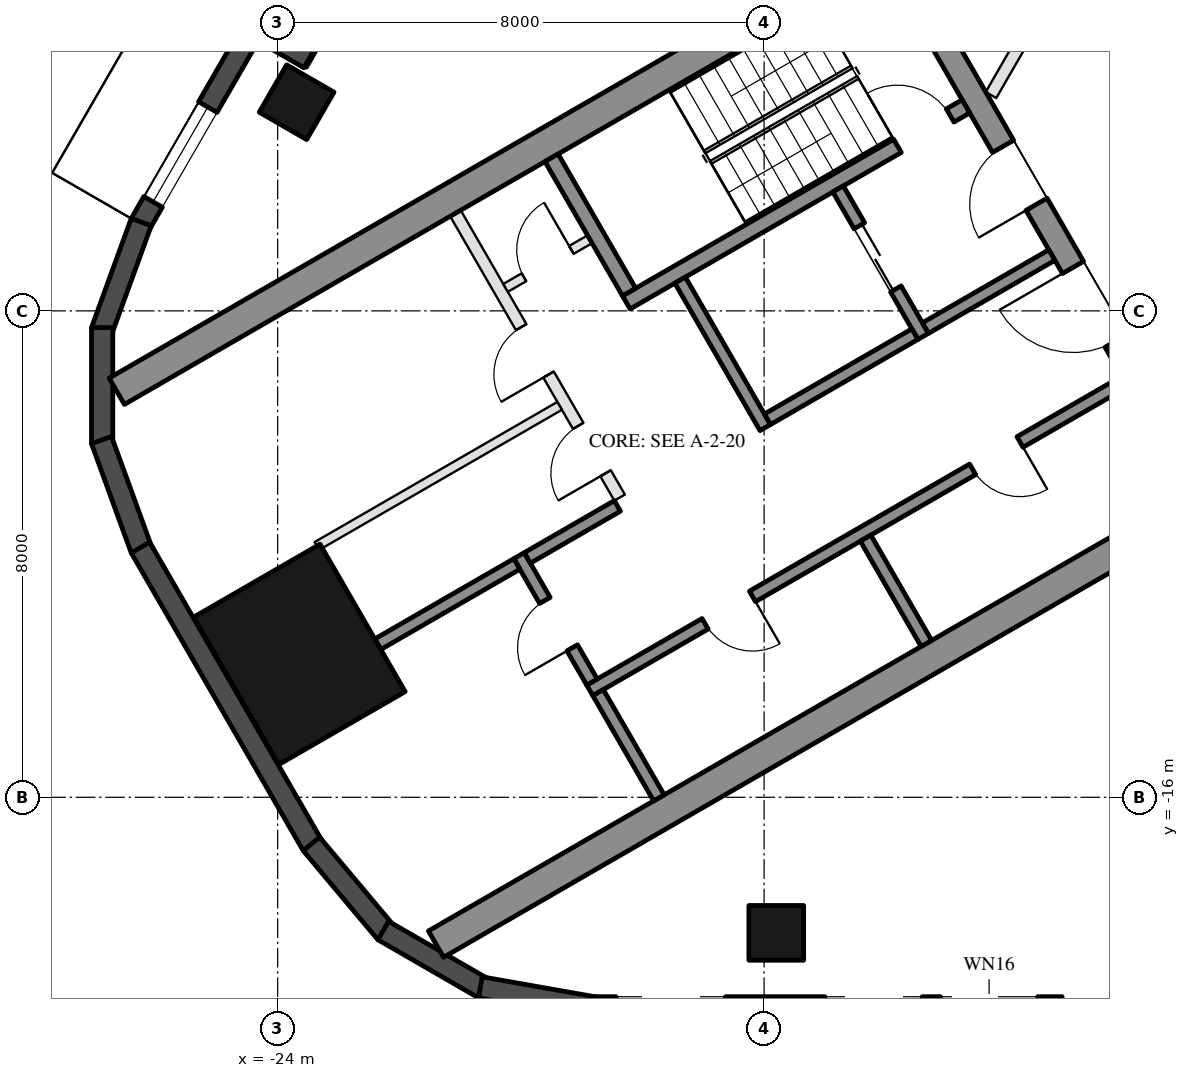
"""IFC4 building model, lengths in metres.
Left out: names, types, materials, properties, quantities, classifications, styles, units other than length and angle.
Written with IfcOpenShell. Run it as: python <this file> out.ifc"""

import sys

from ifc_helpers import new_model, si_unit, direction, frame, frame_2d, origin, origin_2d, place, context, subcontext, project, spatial, rectangle, hollow_rectangle, extrude, element, fill, save


model = new_model("IFC4")
c1 = context("Model", 3, precision=1e-05, world=origin(), true_north=direction((0.0, 1.0)))
c2 = subcontext(c1, "Body", "Model", "MODEL_VIEW")
j1 = project(units=[si_unit("LENGTHUNIT", "METRE"), si_unit("PLANEANGLEUNIT", "RADIAN")], contexts=[c1])
p1 = place(None, origin())
s1 = spatial("IfcSite", under=j1, at=p1, CompositionType="ELEMENT")
p2 = place(p1, origin())
s2 = spatial("IfcBuilding", under=s1, at=p2, CompositionType="ELEMENT")
p3 = place(p2, frame((0.0, 0.0, 94.6)))
s3 = spatial("IfcBuildingStorey", under=s2, at=p3, CompositionType="ELEMENT", Elevation=94.6)
for number, where, z_axis, x_axis in (
    (1, (-15.8, -18.23, 0.0), (0.0, 0.0, 1.0), (-1.0, 0.0, 0.0)),
    (2, (-23.688, -4.568, 0.0), (0.0, 0.0, 1.0), (0.5, 0.866, 0.0)),
):
    element("IfcColumn", number, at=place(p3, frame(where, z_axis=z_axis, x_axis=x_axis)), inside=s3, PredefinedType="COLUMN", context=c2, shape_type="SweptSolid", body=[
        extrude(hollow_rectangle(XDim=0.9, YDim=0.9, WallThickness=0.04, at=origin_2d()), origin(), (0.0, 0.0, 1.0), 3.7),
    ])
p4 = place(p3, frame((-23.643, -13.65, 0.0), z_axis=(0.0, 0.0, 1.0), x_axis=(-0.5, 0.866025403784, 0.0)))
e3 = element("IfcColumn", 3, at=p4, inside=s3, PredefinedType="COLUMN", context=c2, shape_type="SweptSolid", body=[
    extrude(hollow_rectangle(XDim=2.8, YDim=2.4, WallThickness=0.07, at=origin_2d()), origin(), (0.0, 0.0, 1.0), 3.7),
])
p5 = place(p3, frame((-20.309, 1.934, 0.0), z_axis=(0.0, 0.0, 1.0), x_axis=(-0.499992114976, -0.866029956157, 0.0)))
e4 = element("IfcWall", 4, at=p5, inside=s3, PredefinedType="SOLIDWALL", context=c2, shape_type="SweptSolid", body=[
    extrude(rectangle(XDim=6.74, YDim=0.35, at=frame_2d((3.37, 0.0))), origin(), (0.0, 0.0, 1.0), 3.55),
])
p6 = place(p5, frame((4.02, 0.0, 0.0)))
e5 = element("IfcOpeningElement", 5, at=p6, cuts=e4, PredefinedType="OPENING", context=c2, shape_type="SweptSolid", body=[
    extrude(rectangle(XDim=2.4, YDim=2.4, at=frame_2d((1.2, 1.2))), frame((0.0, 0.185, 0.0), z_axis=(0.0, -1.0, 0.0), x_axis=(1.0, 0.0, 0.0)), (0.0, 0.0, 1.0), 0.37),
])
p7 = place(p5, frame((0.77, 0.0, 0.3)))
e6 = element("IfcOpeningElement", 6, at=p7, cuts=e4, PredefinedType="OPENING", context=c2, shape_type="SweptSolid", body=[
    extrude(rectangle(XDim=2.9, YDim=2.65, at=frame_2d((1.45, 1.325))), frame((0.0, 0.185, 0.0), z_axis=(0.0, -1.0, 0.0), x_axis=(1.0, 0.0, 0.0)), (0.0, 0.0, 1.0), 0.37),
])
p8 = place(p3, frame((-23.481, -3.85, 0.0), z_axis=(0.0, 0.0, 1.0), x_axis=(-0.866092288191, 0.499884134912, 0.0)))
e7 = element("IfcWall", 7, at=p8, inside=s3, PredefinedType="SOLIDWALL", context=c2, shape_type="SweptSolid", body=[
    extrude(rectangle(XDim=1.22, YDim=0.35, at=frame_2d((0.61, 0.0))), origin(), (0.0, 0.0, 1.0), 3.55),
])
p9 = place(p3, frame((-24.299, -3.176, 0.0), z_axis=(0.0, 0.0, 1.0), x_axis=(-0.500028278809, -0.866009076391, 0.0)))
e8 = element("IfcWall", 8, at=p9, inside=s3, PredefinedType="SOLIDWALL", context=c2, shape_type="SweptSolid", body=[
    extrude(rectangle(XDim=3.916, YDim=0.35, at=frame_2d((1.958, 0.0))), origin(), (0.0, 0.0, 1.0), 3.55),
])
p10 = place(p9, frame((1.7, 0.0, 0.3)))
e9 = element("IfcOpeningElement", 9, at=p10, cuts=e8, PredefinedType="OPENING", context=c2, shape_type="SweptSolid", body=[
    extrude(rectangle(XDim=1.8, YDim=2.65, at=frame_2d((0.9, 1.325))), frame((0.0, 0.185, 0.0), z_axis=(0.0, -1.0, 0.0), x_axis=(1.0, 0.0, 0.0)), (0.0, 0.0, 1.0), 0.37),
])
for number, where, z_axis, x_axis in (
    (10, (-26.244, -6.54, 0.0), (0.0, 0.0, 1.0), (-0.342, -0.94, 0.0)),
    (11, (-26.886, -8.275, 0.0), (0.0, 0.0, 1.0), (0.0, -1.0, 0.0)),
    (12, (-26.897, -10.125, 0.0), (0.0, 0.0, 1.0), (0.342, -0.94, 0.0)),
):
    element("IfcWall", number, at=place(p3, frame(where, z_axis=z_axis, x_axis=x_axis)), inside=s3, PredefinedType="SOLIDWALL", context=c2, shape_type="SweptSolid", body=[
        extrude(rectangle(XDim=1.91, YDim=0.35, at=frame_2d((0.955, 0.0))), origin(), (0.0, 0.0, 1.0), 3.55),
    ])
p11 = place(p3, frame((-26.257, -11.893, 0.0), z_axis=(0.0, 0.0, 1.0), x_axis=(0.500018773155, -0.866014564827, 0.0)))
e13 = element("IfcWall", 13, at=p11, inside=s3, PredefinedType="SOLIDWALL", context=c2, shape_type="SweptSolid", body=[
    extrude(rectangle(XDim=5.658, YDim=0.35, at=frame_2d((2.829, 0.0))), origin(), (0.0, 0.0, 1.0), 3.55),
])
for number, where, z_axis, x_axis in (
    (14, (-23.445, -16.768, 0.0), (0.0, 0.0, 1.0), (0.643, -0.766, 0.0)),
    (15, (-22.264, -18.192, 0.0), (0.0, 0.0, 1.0), (0.866, -0.5, 0.0)),
):
    element("IfcWall", number, at=place(p3, frame(where, z_axis=z_axis, x_axis=x_axis)), inside=s3, PredefinedType="SOLIDWALL", context=c2, shape_type="SweptSolid", body=[
        extrude(rectangle(XDim=1.91, YDim=0.35, at=frame_2d((0.955, 0.0))), origin(), (0.0, 0.0, 1.0), 3.55),
    ])
p12 = place(p3, frame((-20.667, -19.126, 0.0), z_axis=(0.0, 0.0, 1.0), x_axis=(0.984798995425, -0.173697837091, 0.0)))
e16 = element("IfcWall", 16, at=p12, inside=s3, PredefinedType="SOLIDWALL", context=c2, shape_type="SweptSolid", body=[
    extrude(rectangle(XDim=1.91, YDim=0.35, at=frame_2d((0.955, 0.0))), origin(), (0.0, 0.0, 1.0), 3.55),
])
p13 = place(p3, frame((-18.816, -19.455, 0.0), z_axis=(0.0, 0.0, 1.0), x_axis=(1.0, 0.0, 0.0)))
e17 = element("IfcWall", 17, at=p13, inside=s3, PredefinedType="SOLIDWALL", context=c2, shape_type="SweptSolid", body=[
    extrude(rectangle(XDim=11.816, YDim=0.35, at=frame_2d((5.908, 0.0))), origin(), (0.0, 0.0, 1.0), 3.55),
])
p14 = place(p13, frame((0.381, 0.0, 0.3)))
e18 = element("IfcOpeningElement", 18, at=p14, cuts=e17, PredefinedType="OPENING", context=c2, shape_type="SweptSolid", body=[
    extrude(rectangle(XDim=1.8, YDim=2.65, at=frame_2d((0.9, 1.325))), frame((0.0, 0.185, 0.0), z_axis=(0.0, -1.0, 0.0), x_axis=(1.0, 0.0, 0.0)), (0.0, 0.0, 1.0), 0.37),
])
p15 = place(p13, frame((7.716, 0.0, 0.0)))
e19 = element("IfcOpeningElement", 19, at=p15, cuts=e17, PredefinedType="OPENING", context=c2, shape_type="SweptSolid", body=[
    extrude(rectangle(XDim=2.4, YDim=2.4, at=frame_2d((1.2, 1.2))), frame((0.0, 0.185, 0.0), z_axis=(0.0, -1.0, 0.0), x_axis=(1.0, 0.0, 0.0)), (0.0, 0.0, 1.0), 0.37),
])
p16 = place(p13, frame((3.816, 0.0, 0.3)))
e20 = element("IfcOpeningElement", 20, at=p16, cuts=e17, PredefinedType="OPENING", context=c2, shape_type="SweptSolid", body=[
    extrude(rectangle(XDim=1.6, YDim=2.65, at=frame_2d((0.8, 1.325))), frame((0.0, 0.185, 0.0), z_axis=(0.0, -1.0, 0.0), x_axis=(1.0, 0.0, 0.0)), (0.0, 0.0, 1.0), 0.37),
])
p17 = place(p13, frame((5.716, 0.0, 0.3)))
e21 = element("IfcOpeningElement", 21, at=p17, cuts=e17, PredefinedType="OPENING", context=c2, shape_type="SweptSolid", body=[
    extrude(rectangle(XDim=1.6, YDim=2.65, at=frame_2d((0.8, 1.325))), frame((0.0, 0.185, 0.0), z_axis=(0.0, -1.0, 0.0), x_axis=(1.0, 0.0, 0.0)), (0.0, 0.0, 1.0), 0.37),
])
for number, where, z_axis, x_axis in (
    (22, (-13.797, -1.903, 0.0), (0.0, 0.0, 1.0), (-0.866, -0.5, 0.0)),
    (23, (-8.547, -10.997, 0.0), (0.0, 0.0, 1.0), (-0.866, -0.5, 0.0)),
):
    element("IfcWall", number, at=place(p3, frame(where, z_axis=z_axis, x_axis=x_axis)), inside=s3, PredefinedType="SHEAR", context=c2, shape_type="SweptSolid", body=[
        extrude(rectangle(XDim=14.837, YDim=0.5, at=frame_2d((7.418, 0.0))), origin(), (0.0, 0.0, 1.0), 3.5),
    ])
p18 = place(p3, frame((-13.845, -2.22, 0.0), z_axis=(0.0, 0.0, 1.0), x_axis=(0.500004234368, -0.866022959057, 0.0)))
e24 = element("IfcWall", 24, at=p18, inside=s3, PredefinedType="SHEAR", context=c2, shape_type="SweptSolid", body=[
    extrude(rectangle(XDim=10.0, YDim=0.4, at=frame_2d((5.0, 0.0))), origin(), (0.0, 0.0, 1.0), 3.5),
])
p19 = place(p18, frame((3.55, 0.0, 0.0)))
e25 = element("IfcOpeningElement", 25, at=p19, cuts=e24, PredefinedType="OPENING", context=c2, shape_type="SweptSolid", body=[
    extrude(rectangle(XDim=1.1, YDim=2.1, at=frame_2d((0.55, 1.05))), frame((0.0, 0.21, 0.0), z_axis=(0.0, -1.0, 0.0), x_axis=(1.0, 0.0, 0.0)), (0.0, 0.0, 1.0), 0.42),
])
p20 = place(p18, frame((5.85, 0.0, 0.0)))
e26 = element("IfcOpeningElement", 26, at=p20, cuts=e24, PredefinedType="OPENING", context=c2, shape_type="SweptSolid", body=[
    extrude(rectangle(XDim=1.4, YDim=2.1, at=frame_2d((0.7, 1.05))), frame((0.0, 0.21, 0.0), z_axis=(0.0, -1.0, 0.0), x_axis=(1.0, 0.0, 0.0)), (0.0, 0.0, 1.0), 0.42),
])
p21 = place(p3, frame((-12.681, -4.636, 0.0), z_axis=(0.0, 0.0, 1.0), x_axis=(-0.866021702275, -0.500006411147, 0.0)))
e27 = element("IfcWall", 27, at=p21, inside=s3, PredefinedType="SHEAR", context=c2, shape_type="SweptSolid", body=[
    extrude(rectangle(XDim=6.45, YDim=0.25, at=frame_2d((3.225, 0.0))), origin(), (0.0, 0.0, 1.0), 3.5),
])
p22 = place(p21, frame((0.3, 0.0, 0.0)))
e28 = element("IfcOpeningElement", 28, at=p22, cuts=e27, PredefinedType="OPENING", context=c2, shape_type="SweptSolid", body=[
    extrude(rectangle(XDim=1.0, YDim=2.1, at=frame_2d((0.5, 1.05))), frame((0.0, 0.135, 0.0), z_axis=(0.0, -1.0, 0.0), x_axis=(1.0, 0.0, 0.0)), (0.0, 0.0, 1.0), 0.27),
])
p23 = place(p3, frame((-19.496, -5.482, 0.0), z_axis=(0.0, 0.0, 1.0), x_axis=(0.499990435942, -0.866030925526, 0.0)))
e29 = element("IfcWall", 29, at=p23, inside=s3, PredefinedType="SHEAR", context=c2, shape_type="SweptSolid", body=[
    extrude(rectangle(XDim=2.55, YDim=0.25, at=frame_2d((1.275, 0.0))), origin(), (0.0, 0.0, 1.0), 3.5),
])
p24 = place(p3, frame((-17.381, -7.495, 0.0), z_axis=(0.0, 0.0, 1.0), x_axis=(0.500011755427, -0.866018616679, 0.0)))
e30 = element("IfcWall", 30, at=p24, inside=s3, PredefinedType="SHEAR", context=c2, shape_type="SweptSolid", body=[
    extrude(rectangle(XDim=2.8, YDim=0.2, at=frame_2d((1.4, 0.0))), origin(), (0.0, 0.0, 1.0), 3.5),
])
p25 = place(p3, frame((-14.783, -5.995, 0.0), z_axis=(0.0, 0.0, 1.0), x_axis=(0.49994636267, -0.866056369097, 0.0)))
e31 = element("IfcWall", 31, at=p25, inside=s3, PredefinedType="SHEAR", context=c2, shape_type="SweptSolid", body=[
    extrude(rectangle(XDim=2.8, YDim=0.2, at=frame_2d((1.4, 0.0))), origin(), (0.0, 0.0, 1.0), 3.5),
])
p26 = place(p25, frame((0.7, 0.0, 0.0)))
e32 = element("IfcOpeningElement", 32, at=p26, cuts=e31, PredefinedType="OPENING", context=c2, shape_type="SweptSolid", body=[
    extrude(rectangle(XDim=1.2, YDim=2.1, at=frame_2d((0.6, 1.05))), frame((0.0, 0.11, 0.0), z_axis=(0.0, -1.0, 0.0), x_axis=(1.0, 0.0, 0.0)), (0.0, 0.0, 1.0), 0.22),
])
p27 = place(p3, frame((-13.52, -8.383, 0.0), z_axis=(0.0, 0.0, 1.0), x_axis=(-0.866034573852, -0.49998411664, 0.0)))
e33 = element("IfcWall", 33, at=p27, inside=s3, PredefinedType="SHEAR", context=c2, shape_type="SweptSolid", body=[
    extrude(rectangle(XDim=2.8, YDim=0.2, at=frame_2d((1.4, 0.0))), origin(), (0.0, 0.0, 1.0), 3.5),
])
p28 = place(p3, frame((-11.268, -7.083, 0.0), z_axis=(0.0, 0.0, 1.0), x_axis=(-0.866050077142, -0.499957262057, 0.0)))
e34 = element("IfcWall", 34, at=p28, inside=s3, PredefinedType="SHEAR", context=c2, shape_type="SweptSolid", body=[
    extrude(rectangle(XDim=2.4, YDim=0.2, at=frame_2d((1.2, 0.0))), origin(), (0.0, 0.0, 1.0), 3.5),
])
p29 = place(p3, frame((-10.068, -9.162, 0.0), z_axis=(0.0, 0.0, 1.0), x_axis=(-0.866032725843, -0.499987317609, 0.0)))
e35 = element("IfcWall", 35, at=p29, inside=s3, PredefinedType="SHEAR", context=c2, shape_type="SweptSolid", body=[
    extrude(rectangle(XDim=10.16, YDim=0.2, at=frame_2d((5.08, 0.0))), origin(), (0.0, 0.0, 1.0), 3.5),
])
p30 = place(p29, frame((1.99, 0.0, 0.0)))
e36 = element("IfcOpeningElement", 36, at=p30, cuts=e35, PredefinedType="OPENING", context=c2, shape_type="SweptSolid", body=[
    extrude(rectangle(XDim=0.9, YDim=2.1, at=frame_2d((0.45, 1.05))), frame((0.0, 0.11, 0.0), z_axis=(0.0, -1.0, 0.0), x_axis=(1.0, 0.0, 0.0)), (0.0, 0.0, 1.0), 0.22),
])
p31 = place(p29, frame((7.07, 0.0, 0.0)))
e37 = element("IfcOpeningElement", 37, at=p31, cuts=e35, PredefinedType="OPENING", context=c2, shape_type="SweptSolid", body=[
    extrude(rectangle(XDim=0.9, YDim=2.1, at=frame_2d((0.45, 1.05))), frame((0.0, 0.11, 0.0), z_axis=(0.0, -1.0, 0.0), x_axis=(1.0, 0.0, 0.0)), (0.0, 0.0, 1.0), 0.22),
])
p32 = place(p3, frame((-20.031, -12.026, 0.0), z_axis=(0.0, 0.0, 1.0), x_axis=(0.500033551112, -0.866006032174, 0.0)))
e38 = element("IfcWall", 38, at=p32, inside=s3, PredefinedType="SHEAR", context=c2, shape_type="SweptSolid", body=[
    extrude(rectangle(XDim=2.4, YDim=0.2, at=frame_2d((1.2, 0.0))), origin(), (0.0, 0.0, 1.0), 3.5),
])
p33 = place(p32, frame((0.85, 0.0, 0.0)))
e39 = element("IfcOpeningElement", 39, at=p33, cuts=e38, PredefinedType="OPENING", context=c2, shape_type="SweptSolid", body=[
    extrude(rectangle(XDim=0.9, YDim=2.1, at=frame_2d((0.45, 1.05))), frame((0.0, 0.11, 0.0), z_axis=(0.0, -1.0, 0.0), x_axis=(1.0, 0.0, 0.0)), (0.0, 0.0, 1.0), 0.22),
])
p34 = place(p3, frame((-18.413, -11.208, 0.0), z_axis=(0.0, 0.0, 1.0), x_axis=(-0.866038183914, -0.499977863513, 0.0)))
e40 = element("IfcWall", 40, at=p34, inside=s3, PredefinedType="SHEAR", context=c2, shape_type="SweptSolid", body=[
    extrude(rectangle(XDim=1.71, YDim=0.2, at=frame_2d((0.855, 0.0))), origin(), (0.0, 0.0, 1.0), 3.5),
])
for number, where, z_axis, x_axis in (
    (41, (-14.331, -11.738, 0.0), (0.0, 0.0, 1.0), (0.5, -0.866, 0.0)),
    (42, (-18.73, -14.278, 0.0), (0.0, 0.0, 1.0), (0.5, -0.866, 0.0)),
):
    element("IfcWall", number, at=place(p3, frame(where, z_axis=z_axis, x_axis=x_axis)), inside=s3, PredefinedType="SHEAR", context=c2, shape_type="SweptSolid", body=[
        extrude(rectangle(XDim=2.0, YDim=0.2, at=frame_2d((1.0, 0.0))), origin(), (0.0, 0.0, 1.0), 3.5),
    ])
p35 = place(p3, frame((-20.067, -12.163, 0.0), z_axis=(0.0, 0.0, 1.0), x_axis=(-0.866060851709, -0.499938597367, 0.0)))
e43 = element("IfcWall", 43, at=p35, inside=s3, PredefinedType="SHEAR", context=c2, shape_type="SweptSolid", body=[
    extrude(rectangle(XDim=2.64, YDim=0.2, at=frame_2d((1.32, 0.0))), origin(), (0.0, 0.0, 1.0), 3.5),
])
p36 = place(p3, frame((-21.076, -6.395, 0.0), z_axis=(0.0, 0.0, 1.0), x_axis=(0.50001468107, -0.866016927499, 0.0)))
e44 = element("IfcWall", 44, at=p36, inside=s3, PredefinedType="PARTITIONING", context=c2, shape_type="SweptSolid", body=[
    extrude(rectangle(XDim=5.4, YDim=0.2, at=frame_2d((2.7, 0.0))), origin(), (0.0, 0.0, 1.0), 3.5),
])
p37 = place(p36, frame((2.163, 0.0, 0.0)))
e45 = element("IfcOpeningElement", 45, at=p37, cuts=e44, PredefinedType="OPENING", context=c2, shape_type="SweptSolid", body=[
    extrude(rectangle(XDim=0.9, YDim=2.1, at=frame_2d((0.45, 1.05))), frame((0.0, 0.11, 0.0), z_axis=(0.0, -1.0, 0.0), x_axis=(1.0, 0.0, 0.0)), (0.0, 0.0, 1.0), 0.22),
])
p38 = place(p36, frame((4.038, 0.0, 0.0)))
e46 = element("IfcOpeningElement", 46, at=p38, cuts=e44, PredefinedType="OPENING", context=c2, shape_type="SweptSolid", body=[
    extrude(rectangle(XDim=0.9, YDim=2.1, at=frame_2d((0.45, 1.05))), frame((0.0, 0.11, 0.0), z_axis=(0.0, -1.0, 0.0), x_axis=(1.0, 0.0, 0.0)), (0.0, 0.0, 1.0), 0.22),
])
p39 = place(p3, frame((-18.866, -6.822, 0.0), z_axis=(0.0, 0.0, 1.0), x_axis=(-0.866028054938, -0.499995408039, 0.0)))
e47 = element("IfcWall", 47, at=p39, inside=s3, PredefinedType="PARTITIONING", context=c2, shape_type="SweptSolid", body=[
    extrude(rectangle(XDim=1.6, YDim=0.15, at=frame_2d((0.8, 0.0))), origin(), (0.0, 0.0, 1.0), 3.5),
])
p40 = place(p39, frame((0.35, 0.0, 0.0)))
e48 = element("IfcOpeningElement", 48, at=p40, cuts=e47, PredefinedType="OPENING", context=c2, shape_type="SweptSolid", body=[
    extrude(rectangle(XDim=0.9, YDim=2.1, at=frame_2d((0.45, 1.05))), frame((0.0, 0.085, 0.0), z_axis=(0.0, -1.0, 0.0), x_axis=(1.0, 0.0, 0.0)), (0.0, 0.0, 1.0), 0.17),
])
p41 = place(p3, frame((-19.363, -9.562, 0.0), z_axis=(0.0, 0.0, 1.0), x_axis=(-0.86601185002, -0.500023475074, 0.0)))
e49 = element("IfcWall", 49, at=p41, inside=s3, PredefinedType="PARTITIONING", context=c2, shape_type="SweptSolid", body=[
    extrude(rectangle(XDim=4.61, YDim=0.15, at=frame_2d((2.305, 0.0))), origin(), (0.0, 0.0, 1.0), 3.5),
])
p42 = place(p3, frame((-12.269, -4.45, 0.0), z_axis=(0.0, 0.0, 1.0), x_axis=(0.500015331954, 0.866016551696, 0.0)))
e50 = element("IfcWall", 50, at=p42, inside=s3, PredefinedType="PARTITIONING", context=c2, shape_type="SweptSolid", body=[
    extrude(rectangle(XDim=4.979, YDim=0.2, at=frame_2d((2.489, 0.0))), origin(), (0.0, 0.0, 1.0), 2.95),
])
p43 = place(p42, frame((1.99, 0.0, 0.0)))
e51 = element("IfcOpeningElement", 51, at=p43, cuts=e50, PredefinedType="OPENING", context=c2, shape_type="SweptSolid", body=[
    extrude(rectangle(XDim=1.0, YDim=2.1, at=frame_2d((0.5, 1.05))), frame((0.0, 0.11, 0.0), z_axis=(0.0, -1.0, 0.0), x_axis=(1.0, 0.0, 0.0)), (0.0, 0.0, 1.0), 0.22),
])
p44 = place(p10, origin())
e52 = element("IfcWindow", 52, at=p44, inside=s3, PartitioningType="SINGLE_PANEL", PredefinedType="WINDOW", context=c2, shape_type="SweptSolid", body=[
    extrude(rectangle(XDim=1.8, YDim=2.65, at=frame_2d((0.9, 1.325))), frame((0.0, 0.03, 0.0), z_axis=(0.0, -1.0, 0.0), x_axis=(1.0, 0.0, 0.0)), (0.0, 0.0, 1.0), 0.06),
])
fill(e9, e52)
p45 = place(p26, origin())
e53 = element("IfcDoor", 53, at=p45, inside=s3, OperationType="DOUBLE_DOOR_SLIDING", PredefinedType="DOOR", context=c2, shape_type="SweptSolid", body=[
    extrude(rectangle(XDim=1.2, YDim=2.1, at=frame_2d((0.6, 1.05))), frame((0.0, 0.025, 0.0), z_axis=(0.0, -1.0, 0.0), x_axis=(1.0, 0.0, 0.0)), (0.0, 0.0, 1.0), 0.05),
])
fill(e32, e53)
p46 = place(p40, frame((0.9, 0.0, 0.0), z_axis=(0.0, 0.0, 1.0), x_axis=(-1.0, 0.0, 0.0)))
e54 = element("IfcDoor", 54, at=p46, inside=s3, OperationType="SINGLE_SWING_RIGHT", PredefinedType="DOOR", context=c2, shape_type="SweptSolid", body=[
    extrude(rectangle(XDim=0.9, YDim=2.1, at=frame_2d((0.45, 1.05))), frame((0.0, 0.025, 0.0), z_axis=(0.0, -1.0, 0.0), x_axis=(1.0, 0.0, 0.0)), (0.0, 0.0, 1.0), 0.05),
])
fill(e48, e54)
p47 = place(p30, origin())
e55 = element("IfcDoor", 55, at=p47, inside=s3, OperationType="SINGLE_SWING_LEFT", PredefinedType="DOOR", context=c2, shape_type="SweptSolid", body=[
    extrude(rectangle(XDim=0.9, YDim=2.1, at=frame_2d((0.45, 1.05))), frame((0.0, 0.025, 0.0), z_axis=(0.0, -1.0, 0.0), x_axis=(1.0, 0.0, 0.0)), (0.0, 0.0, 1.0), 0.05),
])
fill(e36, e55)
p48 = place(p31, origin())
e56 = element("IfcDoor", 56, at=p48, inside=s3, OperationType="SINGLE_SWING_LEFT", PredefinedType="DOOR", context=c2, shape_type="SweptSolid", body=[
    extrude(rectangle(XDim=0.9, YDim=2.1, at=frame_2d((0.45, 1.05))), frame((0.0, 0.025, 0.0), z_axis=(0.0, -1.0, 0.0), x_axis=(1.0, 0.0, 0.0)), (0.0, 0.0, 1.0), 0.05),
])
fill(e37, e56)
p49 = place(p33, frame((0.9, 0.0, 0.0), z_axis=(0.0, 0.0, 1.0), x_axis=(-1.0, 0.0, 0.0)))
e57 = element("IfcDoor", 57, at=p49, inside=s3, OperationType="SINGLE_SWING_LEFT", PredefinedType="DOOR", context=c2, shape_type="SweptSolid", body=[
    extrude(rectangle(XDim=0.9, YDim=2.1, at=frame_2d((0.45, 1.05))), frame((0.0, 0.025, 0.0), z_axis=(0.0, -1.0, 0.0), x_axis=(1.0, 0.0, 0.0)), (0.0, 0.0, 1.0), 0.05),
])
fill(e39, e57)
p50 = place(p37, frame((0.9, 0.0, 0.0), z_axis=(0.0, 0.0, 1.0), x_axis=(-1.0, 0.0, 0.0)))
e58 = element("IfcDoor", 58, at=p50, inside=s3, OperationType="SINGLE_SWING_LEFT", PredefinedType="DOOR", context=c2, shape_type="SweptSolid", body=[
    extrude(rectangle(XDim=0.9, YDim=2.1, at=frame_2d((0.45, 1.05))), frame((0.0, 0.025, 0.0), z_axis=(0.0, -1.0, 0.0), x_axis=(1.0, 0.0, 0.0)), (0.0, 0.0, 1.0), 0.05),
])
fill(e45, e58)
p51 = place(p38, frame((0.9, 0.0, 0.0), z_axis=(0.0, 0.0, 1.0), x_axis=(-1.0, 0.0, 0.0)))
e59 = element("IfcDoor", 59, at=p51, inside=s3, OperationType="SINGLE_SWING_LEFT", PredefinedType="DOOR", context=c2, shape_type="SweptSolid", body=[
    extrude(rectangle(XDim=0.9, YDim=2.1, at=frame_2d((0.45, 1.05))), frame((0.0, 0.025, 0.0), z_axis=(0.0, -1.0, 0.0), x_axis=(1.0, 0.0, 0.0)), (0.0, 0.0, 1.0), 0.05),
])
fill(e46, e59)
p52 = place(p19, frame((1.1, 0.0, 0.0), z_axis=(0.0, 0.0, 1.0), x_axis=(-1.0, 0.0, 0.0)))
e60 = element("IfcDoor", 60, at=p52, inside=s3, OperationType="SINGLE_SWING_LEFT", PredefinedType="DOOR", context=c2, shape_type="SweptSolid", body=[
    extrude(rectangle(XDim=1.1, YDim=2.1, at=frame_2d((0.55, 1.05))), frame((0.0, 0.025, 0.0), z_axis=(0.0, -1.0, 0.0), x_axis=(1.0, 0.0, 0.0)), (0.0, 0.0, 1.0), 0.05),
])
fill(e25, e60)
p53 = place(p20, frame((1.4, 0.0, 0.0), z_axis=(0.0, 0.0, 1.0), x_axis=(-1.0, 0.0, 0.0)))
e61 = element("IfcDoor", 61, at=p53, inside=s3, OperationType="DOUBLE_DOOR_SINGLE_SWING", PredefinedType="DOOR", context=c2, shape_type="SweptSolid", body=[
    extrude(rectangle(XDim=1.4, YDim=2.1, at=frame_2d((0.7, 1.05))), frame((0.0, 0.025, 0.0), z_axis=(0.0, -1.0, 0.0), x_axis=(1.0, 0.0, 0.0)), (0.0, 0.0, 1.0), 0.05),
])
fill(e26, e61)
p54 = place(p22, frame((1.0, 0.0, 0.0), z_axis=(0.0, 0.0, 1.0), x_axis=(-1.0, 0.0, 0.0)))
e62 = element("IfcDoor", 62, at=p54, inside=s3, OperationType="SINGLE_SWING_LEFT", PredefinedType="DOOR", context=c2, shape_type="SweptSolid", body=[
    extrude(rectangle(XDim=1.0, YDim=2.1, at=frame_2d((0.5, 1.05))), frame((0.0, 0.025, 0.0), z_axis=(0.0, -1.0, 0.0), x_axis=(1.0, 0.0, 0.0)), (0.0, 0.0, 1.0), 0.05),
])
fill(e28, e62)
save(model, sys.argv[1])
